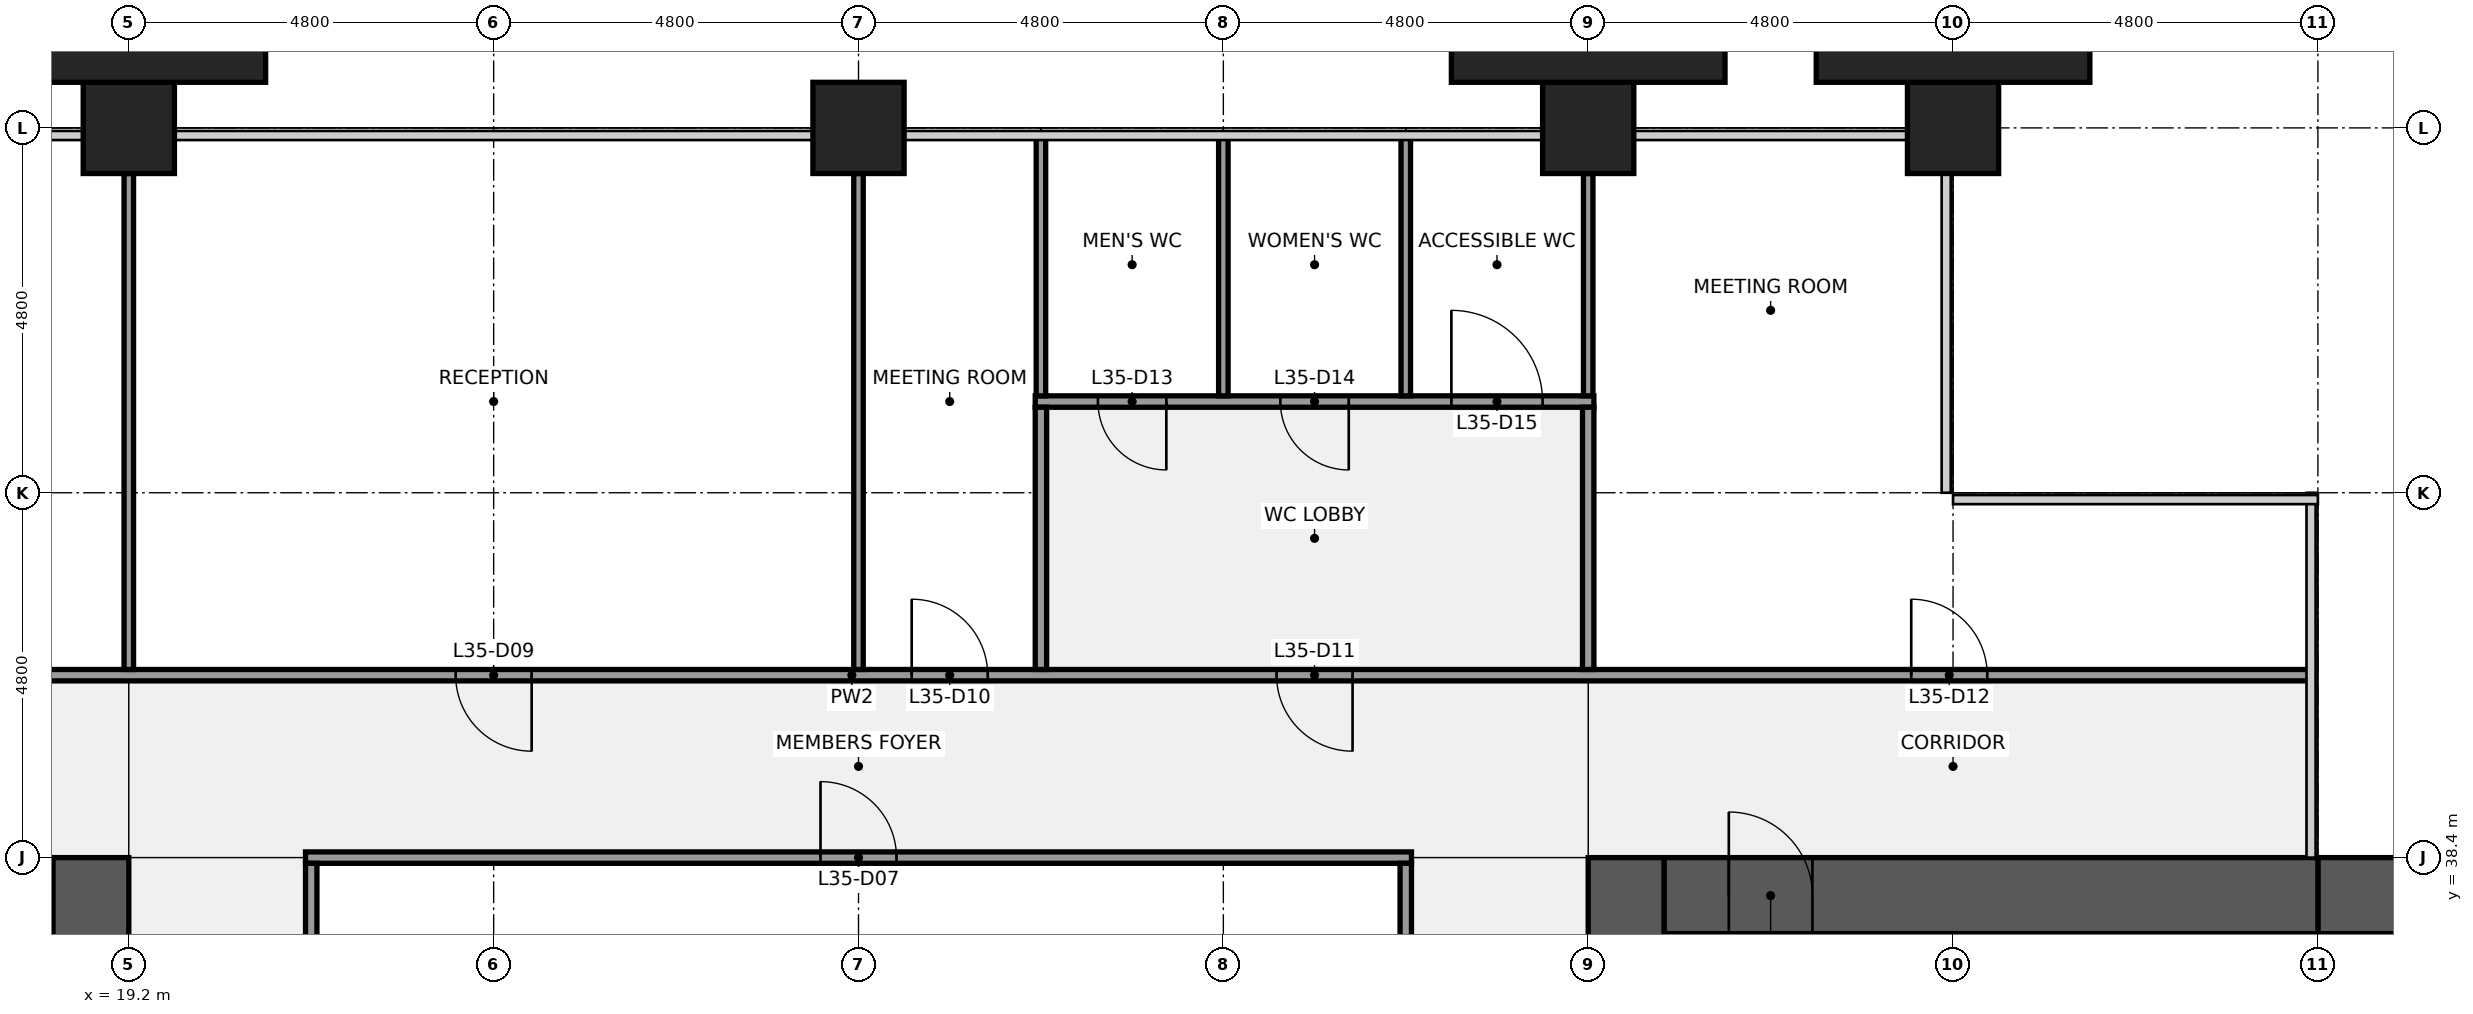
"""IFC4 building model, lengths in metres.
Left out: names, types, materials, properties, quantities, classifications, styles, units other than length and angle.
Written with IfcOpenShell. Run it as: python <this file> out.ifc"""

import sys

from ifc_helpers import new_model, si_unit, direction, frame, frame_2d, origin, origin_2d, place, context, subcontext, project, spatial, rectangle, extrude, element, fill, save


model = new_model("IFC4")
c1 = context("Model", 3, precision=1e-05, world=origin(), true_north=direction((0.0, 1.0)))
c2 = subcontext(c1, "Body", "Model", "MODEL_VIEW")
j1 = project(units=[si_unit("LENGTHUNIT", "METRE"), si_unit("PLANEANGLEUNIT", "RADIAN")], contexts=[c1])
p1 = place(None, origin())
s1 = spatial("IfcSite", under=j1, at=p1, CompositionType="ELEMENT")
p2 = place(p1, origin())
s2 = spatial("IfcBuilding", under=s1, at=p2, CompositionType="ELEMENT")
p3 = place(p2, frame((0.0, 0.0, 160.1)))
s3 = spatial("IfcBuildingStorey", under=s2, at=p3, CompositionType="ELEMENT", Elevation=160.1)
for number, where, z_axis, x_axis in (
    (1, (19.2, 48.0, 0.0), (0.0, 0.0, 1.0), (1.0, 0.0, 0.0)),
    (2, (28.8, 48.0, 0.0), (0.0, 0.0, 1.0), (1.0, 0.0, 0.0)),
    (3, (38.4, 48.0, 0.0), (0.0, 0.0, 1.0), (1.0, 0.0, 0.0)),
    (4, (43.2, 48.0, 0.0), (0.0, 0.0, 1.0), (1.0, 0.0, 0.0)),
):
    element("IfcColumn", number, at=place(p3, frame(where, z_axis=z_axis, x_axis=x_axis)), inside=s3, PredefinedType="COLUMN", context=c2, shape_type="SweptSolid", body=[
        extrude(rectangle(XDim=1.2, YDim=1.2, at=origin_2d()), origin(), (0.0, 0.0, 1.0), 4.0),
    ])
p4 = place(p3, frame((18.7, 38.4, 0.0), z_axis=(0.0, 0.0, 1.0), x_axis=(0.0, -1.0, 0.0)))
e5 = element("IfcWall", 5, at=p4, inside=s3, PredefinedType="SHEAR", context=c2, shape_type="SweptSolid", body=[
    extrude(rectangle(XDim=28.8, YDim=1.0, at=frame_2d((14.4, 0.0))), origin(), (0.0, 0.0, 1.0), 3.84),
])
p5 = place(p4, frame((18.3, 0.0, 0.0)))
e6 = element("IfcOpeningElement", 6, at=p5, cuts=e5, PredefinedType="OPENING", context=c2, shape_type="SweptSolid", body=[
    extrude(rectangle(XDim=1.8, YDim=2.1, at=frame_2d((0.9, 1.05))), frame((0.0, 0.51, 0.0), z_axis=(0.0, -1.0, 0.0), x_axis=(1.0, 0.0, 0.0)), (0.0, 0.0, 1.0), 1.02),
])
p6 = place(p4, frame((8.7, 0.0, 0.0)))
e7 = element("IfcOpeningElement", 7, at=p6, cuts=e5, PredefinedType="OPENING", context=c2, shape_type="SweptSolid", body=[
    extrude(rectangle(XDim=1.8, YDim=2.1, at=frame_2d((0.9, 1.05))), frame((0.0, 0.51, 0.0), z_axis=(0.0, -1.0, 0.0), x_axis=(1.0, 0.0, 0.0)), (0.0, 0.0, 1.0), 1.02),
])
p7 = place(p3, frame((38.9, 9.6, 0.0), z_axis=(0.0, 0.0, 1.0), x_axis=(0.0, 1.0, 0.0)))
e8 = element("IfcWall", 8, at=p7, inside=s3, PredefinedType="SHEAR", context=c2, shape_type="SweptSolid", body=[
    extrude(rectangle(XDim=28.8, YDim=1.0, at=frame_2d((14.4, 0.0))), origin(), (0.0, 0.0, 1.0), 3.84),
])
p8 = place(p7, frame((8.7, 0.0, 0.0)))
e9 = element("IfcOpeningElement", 9, at=p8, cuts=e8, PredefinedType="OPENING", context=c2, shape_type="SweptSolid", body=[
    extrude(rectangle(XDim=1.8, YDim=2.1, at=frame_2d((0.9, 1.05))), frame((0.0, 0.51, 0.0), z_axis=(0.0, -1.0, 0.0), x_axis=(1.0, 0.0, 0.0)), (0.0, 0.0, 1.0), 1.02),
])
p9 = place(p7, frame((18.3, 0.0, 0.0)))
e10 = element("IfcOpeningElement", 10, at=p9, cuts=e8, PredefinedType="OPENING", context=c2, shape_type="SweptSolid", body=[
    extrude(rectangle(XDim=1.8, YDim=2.1, at=frame_2d((0.9, 1.05))), frame((0.0, 0.51, 0.0), z_axis=(0.0, -1.0, 0.0), x_axis=(1.0, 0.0, 0.0)), (0.0, 0.0, 1.0), 1.02),
])
p10 = place(p3, frame((48.0, 37.3, 0.0), z_axis=(0.0, 0.0, 1.0), x_axis=(1.0, 0.0, 0.0)))
e11 = element("IfcWall", 11, at=p10, inside=s3, PredefinedType="SHEAR", context=c2, shape_type="SweptSolid", body=[
    extrude(rectangle(XDim=3.35, YDim=0.2, at=frame_2d((1.675, 0.0))), origin(), (0.0, 0.0, 1.0), 3.84),
])
p11 = place(p3, frame((43.85, 37.3, 0.0), z_axis=(0.0, 0.0, 1.0), x_axis=(1.0, 0.0, 0.0)))
e12 = element("IfcWall", 12, at=p11, inside=s3, PredefinedType="SHEAR", context=c2, shape_type="SweptSolid", body=[
    extrude(rectangle(XDim=4.15, YDim=0.2, at=frame_2d((2.075, 0.0))), origin(), (0.0, 0.0, 1.0), 3.84),
])
p12 = place(p3, frame((48.0, 37.9, 0.0), z_axis=(0.0, 0.0, 1.0), x_axis=(1.0, 0.0, 0.0)))
e13 = element("IfcWall", 13, at=p12, inside=s3, PredefinedType="SHEAR", context=c2, shape_type="SweptSolid", body=[
    extrude(rectangle(XDim=8.6, YDim=1.0, at=frame_2d((4.3, 0.0))), origin(), (0.0, 0.0, 1.0), 3.84),
])
p13 = place(p12, frame((1.5, 0.0, 0.9)))
e14 = element("IfcOpeningElement", 14, at=p13, cuts=e13, PredefinedType="OPENING", context=c2, shape_type="SweptSolid", body=[
    extrude(rectangle(XDim=1.8, YDim=1.5, at=frame_2d((0.9, 0.75))), frame((0.0, 0.51, 0.0), z_axis=(0.0, -1.0, 0.0), x_axis=(1.0, 0.0, 0.0)), (0.0, 0.0, 1.0), 1.02),
])
p14 = place(p3, frame((39.4, 37.9, 0.0), z_axis=(0.0, 0.0, 1.0), x_axis=(1.0, 0.0, 0.0)))
e15 = element("IfcWall", 15, at=p14, inside=s3, PredefinedType="SHEAR", context=c2, shape_type="SweptSolid", body=[
    extrude(rectangle(XDim=8.6, YDim=1.0, at=frame_2d((4.3, 0.0))), origin(), (0.0, 0.0, 1.0), 3.84),
])
p15 = place(p14, frame((0.85, 0.0, 0.0)))
e16 = element("IfcOpeningElement", 16, at=p15, cuts=e15, PredefinedType="OPENING", context=c2, shape_type="SweptSolid", body=[
    extrude(rectangle(XDim=1.1, YDim=2.1, at=frame_2d((0.55, 1.05))), frame((0.0, 0.51, 0.0), z_axis=(0.0, -1.0, 0.0), x_axis=(1.0, 0.0, 0.0)), (0.0, 0.0, 1.0), 1.02),
])
p16 = place(p3, frame((21.525, 38.4, 0.0), z_axis=(0.0, 0.0, 1.0), x_axis=(1.0, 0.0, 0.0)))
e17 = element("IfcWall", 17, at=p16, inside=s3, PredefinedType="PARTITIONING", context=c2, shape_type="SweptSolid", body=[
    extrude(rectangle(XDim=14.55, YDim=0.15, at=frame_2d((7.275, 0.0))), origin(), (0.0, 0.0, 1.0), 2.849),
])
p17 = place(p16, frame((6.775, 0.0, 0.0)))
e18 = element("IfcOpeningElement", 18, at=p17, cuts=e17, PredefinedType="OPENING", context=c2, shape_type="SweptSolid", body=[
    extrude(rectangle(XDim=1.0, YDim=2.1, at=frame_2d((0.5, 1.05))), frame((0.0, 0.085, 0.0), z_axis=(0.0, -1.0, 0.0), x_axis=(1.0, 0.0, 0.0)), (0.0, 0.0, 1.0), 0.17),
])
p18 = place(p3, frame((9.525, 40.8, 0.0), z_axis=(0.0, 0.0, 1.0), x_axis=(1.0, 0.0, 0.0)))
e19 = element("IfcWall", 19, at=p18, inside=s3, PredefinedType="PARTITIONING", context=c2, shape_type="SweptSolid", body=[
    extrude(rectangle(XDim=38.375, YDim=0.15, at=frame_2d((19.188, 0.0))), origin(), (0.0, 0.0, 1.0), 2.849),
])
p19 = place(p18, frame((4.375, 0.0, 0.0)))
e20 = element("IfcOpeningElement", 20, at=p19, cuts=e19, PredefinedType="OPENING", context=c2, shape_type="SweptSolid", body=[
    extrude(rectangle(XDim=1.0, YDim=2.1, at=frame_2d((0.5, 1.05))), frame((0.0, 0.085, 0.0), z_axis=(0.0, -1.0, 0.0), x_axis=(1.0, 0.0, 0.0)), (0.0, 0.0, 1.0), 0.17),
])
p20 = place(p18, frame((13.975, 0.0, 0.0)))
e21 = element("IfcOpeningElement", 21, at=p20, cuts=e19, PredefinedType="OPENING", context=c2, shape_type="SweptSolid", body=[
    extrude(rectangle(XDim=1.0, YDim=2.1, at=frame_2d((0.5, 1.05))), frame((0.0, 0.085, 0.0), z_axis=(0.0, -1.0, 0.0), x_axis=(1.0, 0.0, 0.0)), (0.0, 0.0, 1.0), 0.17),
])
p21 = place(p18, frame((19.975, 0.0, 0.0)))
e22 = element("IfcOpeningElement", 22, at=p21, cuts=e19, PredefinedType="OPENING", context=c2, shape_type="SweptSolid", body=[
    extrude(rectangle(XDim=1.0, YDim=2.1, at=frame_2d((0.5, 1.05))), frame((0.0, 0.085, 0.0), z_axis=(0.0, -1.0, 0.0), x_axis=(1.0, 0.0, 0.0)), (0.0, 0.0, 1.0), 0.17),
])
p22 = place(p18, frame((24.775, 0.0, 0.0)))
e23 = element("IfcOpeningElement", 23, at=p22, cuts=e19, PredefinedType="OPENING", context=c2, shape_type="SweptSolid", body=[
    extrude(rectangle(XDim=1.0, YDim=2.1, at=frame_2d((0.5, 1.05))), frame((0.0, 0.085, 0.0), z_axis=(0.0, -1.0, 0.0), x_axis=(1.0, 0.0, 0.0)), (0.0, 0.0, 1.0), 0.17),
])
p23 = place(p18, frame((33.125, 0.0, 0.0)))
e24 = element("IfcOpeningElement", 24, at=p23, cuts=e19, PredefinedType="OPENING", context=c2, shape_type="SweptSolid", body=[
    extrude(rectangle(XDim=1.0, YDim=2.1, at=frame_2d((0.5, 1.05))), frame((0.0, 0.085, 0.0), z_axis=(0.0, -1.0, 0.0), x_axis=(1.0, 0.0, 0.0)), (0.0, 0.0, 1.0), 0.17),
])
p24 = place(p3, frame((31.125, 44.4, 0.0), z_axis=(0.0, 0.0, 1.0), x_axis=(1.0, 0.0, 0.0)))
e25 = element("IfcWall", 25, at=p24, inside=s3, PredefinedType="PARTITIONING", context=c2, shape_type="SweptSolid", body=[
    extrude(rectangle(XDim=7.35, YDim=0.15, at=frame_2d((3.675, 0.0))), origin(), (0.0, 0.0, 1.0), 2.849),
])
p25 = place(p24, frame((0.825, 0.0, 0.0)))
e26 = element("IfcOpeningElement", 26, at=p25, cuts=e25, PredefinedType="OPENING", context=c2, shape_type="SweptSolid", body=[
    extrude(rectangle(XDim=0.9, YDim=2.1, at=frame_2d((0.45, 1.05))), frame((0.0, 0.085, 0.0), z_axis=(0.0, -1.0, 0.0), x_axis=(1.0, 0.0, 0.0)), (0.0, 0.0, 1.0), 0.17),
])
p26 = place(p24, frame((3.225, 0.0, 0.0)))
e27 = element("IfcOpeningElement", 27, at=p26, cuts=e25, PredefinedType="OPENING", context=c2, shape_type="SweptSolid", body=[
    extrude(rectangle(XDim=0.9, YDim=2.1, at=frame_2d((0.45, 1.05))), frame((0.0, 0.085, 0.0), z_axis=(0.0, -1.0, 0.0), x_axis=(1.0, 0.0, 0.0)), (0.0, 0.0, 1.0), 0.17),
])
p27 = place(p24, frame((5.475, 0.0, 0.0)))
e28 = element("IfcOpeningElement", 28, at=p27, cuts=e25, PredefinedType="OPENING", context=c2, shape_type="SweptSolid", body=[
    extrude(rectangle(XDim=1.2, YDim=2.1, at=frame_2d((0.6, 1.05))), frame((0.0, 0.085, 0.0), z_axis=(0.0, -1.0, 0.0), x_axis=(1.0, 0.0, 0.0)), (0.0, 0.0, 1.0), 0.17),
])
p28 = place(p3, frame((19.2, 40.875, 0.0), z_axis=(0.0, 0.0, 1.0), x_axis=(0.0, 1.0, 0.0)))
e29 = element("IfcWall", 29, at=p28, inside=s3, PredefinedType="PARTITIONING", context=c2, shape_type="SweptSolid", body=[
    extrude(rectangle(XDim=6.525, YDim=0.125, at=frame_2d((3.262, 0.0))), origin(), (0.0, 0.0, 1.0), 2.849),
])
p29 = place(p3, frame((21.6, 33.675, 0.0), z_axis=(0.0, 0.0, 1.0), x_axis=(0.0, 1.0, 0.0)))
e30 = element("IfcWall", 30, at=p29, inside=s3, PredefinedType="PARTITIONING", context=c2, shape_type="SweptSolid", body=[
    extrude(rectangle(XDim=4.65, YDim=0.15, at=frame_2d((2.325, 0.0))), origin(), (0.0, 0.0, 1.0), 2.849),
])
p30 = place(p3, frame((28.8, 40.875, 0.0), z_axis=(0.0, 0.0, 1.0), x_axis=(0.0, 1.0, 0.0)))
e31 = element("IfcWall", 31, at=p30, inside=s3, PredefinedType="PARTITIONING", context=c2, shape_type="SweptSolid", body=[
    extrude(rectangle(XDim=6.525, YDim=0.125, at=frame_2d((3.262, 0.0))), origin(), (0.0, 0.0, 1.0), 2.849),
])
p31 = place(p3, frame((31.2, 44.475, 0.0), z_axis=(0.0, 0.0, 1.0), x_axis=(0.0, 1.0, 0.0)))
e32 = element("IfcWall", 32, at=p31, inside=s3, PredefinedType="PARTITIONING", context=c2, shape_type="SweptSolid", body=[
    extrude(rectangle(XDim=3.425, YDim=0.125, at=frame_2d((1.712, 0.0))), origin(), (0.0, 0.0, 1.0), 2.849),
])
p32 = place(p3, frame((31.2, 40.875, 0.0), z_axis=(0.0, 0.0, 1.0), x_axis=(0.0, 1.0, 0.0)))
e33 = element("IfcWall", 33, at=p32, inside=s3, PredefinedType="PARTITIONING", context=c2, shape_type="SweptSolid", body=[
    extrude(rectangle(XDim=3.45, YDim=0.15, at=frame_2d((1.725, 0.0))), origin(), (0.0, 0.0, 1.0), 2.849),
])
for number, where, z_axis, x_axis in (
    (34, (33.6, 44.475, 0.0), (0.0, 0.0, 1.0), (0.0, 1.0, 0.0)),
    (35, (36.0, 44.475, 0.0), (0.0, 0.0, 1.0), (0.0, 1.0, 0.0)),
):
    element("IfcWall", number, at=place(p3, frame(where, z_axis=z_axis, x_axis=x_axis)), inside=s3, PredefinedType="PARTITIONING", context=c2, shape_type="SweptSolid", body=[
        extrude(rectangle(XDim=3.425, YDim=0.125, at=frame_2d((1.712, 0.0))), origin(), (0.0, 0.0, 1.0), 2.849),
    ])
p33 = place(p3, frame((36.0, 33.675, 0.0), z_axis=(0.0, 0.0, 1.0), x_axis=(0.0, 1.0, 0.0)))
e36 = element("IfcWall", 36, at=p33, inside=s3, PredefinedType="PARTITIONING", context=c2, shape_type="SweptSolid", body=[
    extrude(rectangle(XDim=4.65, YDim=0.15, at=frame_2d((2.325, 0.0))), origin(), (0.0, 0.0, 1.0), 2.849),
])
p34 = place(p3, frame((38.4, 44.475, 0.0), z_axis=(0.0, 0.0, 1.0), x_axis=(0.0, 1.0, 0.0)))
e37 = element("IfcWall", 37, at=p34, inside=s3, PredefinedType="PARTITIONING", context=c2, shape_type="SweptSolid", body=[
    extrude(rectangle(XDim=2.925, YDim=0.125, at=frame_2d((1.462, 0.0))), origin(), (0.0, 0.0, 1.0), 2.849),
])
p35 = place(p3, frame((38.4, 40.875, 0.0), z_axis=(0.0, 0.0, 1.0), x_axis=(0.0, 1.0, 0.0)))
e38 = element("IfcWall", 38, at=p35, inside=s3, PredefinedType="PARTITIONING", context=c2, shape_type="SweptSolid", body=[
    extrude(rectangle(XDim=3.45, YDim=0.15, at=frame_2d((1.725, 0.0))), origin(), (0.0, 0.0, 1.0), 2.849),
])
for number, where, z_axis, x_axis in (
    (39, (19.2, 49.05, 0.0), (0.0, 0.0, 1.0), (1.0, 0.0, 0.0)),
    (40, (38.4, 49.05, 0.0), (0.0, 0.0, 1.0), (1.0, 0.0, 0.0)),
    (41, (43.2, 49.05, 0.0), (0.0, 0.0, 1.0), (1.0, 0.0, 0.0)),
):
    element("IfcColumn", number, at=place(p3, frame(where, z_axis=z_axis, x_axis=x_axis)), inside=s3, PredefinedType="PILASTER", context=c2, shape_type="SweptSolid", body=[
        extrude(rectangle(XDim=3.6, YDim=0.9, at=origin_2d()), origin(), (0.0, 0.0, 1.0), 4.0),
    ])
p36 = place(p15, origin())
e42 = element("IfcDoor", 42, at=p36, inside=s3, OperationType="SINGLE_SWING_LEFT", PredefinedType="DOOR", context=c2, shape_type="SweptSolid", body=[
    extrude(rectangle(XDim=1.1, YDim=2.1, at=frame_2d((0.55, 1.05))), frame((0.0, 0.025, 0.0), z_axis=(0.0, -1.0, 0.0), x_axis=(1.0, 0.0, 0.0)), (0.0, 0.0, 1.0), 0.05),
])
fill(e16, e42)
p37 = place(p17, origin())
e43 = element("IfcDoor", 43, at=p37, inside=s3, OperationType="SINGLE_SWING_LEFT", PredefinedType="DOOR", context=c2, shape_type="SweptSolid", body=[
    extrude(rectangle(XDim=1.0, YDim=2.1, at=frame_2d((0.5, 1.05))), frame((0.0, 0.025, 0.0), z_axis=(0.0, -1.0, 0.0), x_axis=(1.0, 0.0, 0.0)), (0.0, 0.0, 1.0), 0.05),
])
fill(e18, e43)
p38 = place(p20, origin())
e44 = element("IfcDoor", 44, at=p38, inside=s3, OperationType="SINGLE_SWING_RIGHT", PredefinedType="DOOR", context=c2, shape_type="SweptSolid", body=[
    extrude(rectangle(XDim=1.0, YDim=2.1, at=frame_2d((0.5, 1.05))), frame((0.0, 0.025, 0.0), z_axis=(0.0, -1.0, 0.0), x_axis=(1.0, 0.0, 0.0)), (0.0, 0.0, 1.0), 0.05),
])
fill(e21, e44)
p39 = place(p21, origin())
e45 = element("IfcDoor", 45, at=p39, inside=s3, OperationType="SINGLE_SWING_LEFT", PredefinedType="DOOR", context=c2, shape_type="SweptSolid", body=[
    extrude(rectangle(XDim=1.0, YDim=2.1, at=frame_2d((0.5, 1.05))), frame((0.0, 0.025, 0.0), z_axis=(0.0, -1.0, 0.0), x_axis=(1.0, 0.0, 0.0)), (0.0, 0.0, 1.0), 0.05),
])
fill(e22, e45)
p40 = place(p22, origin())
e46 = element("IfcDoor", 46, at=p40, inside=s3, OperationType="SINGLE_SWING_RIGHT", PredefinedType="DOOR", context=c2, shape_type="SweptSolid", body=[
    extrude(rectangle(XDim=1.0, YDim=2.1, at=frame_2d((0.5, 1.05))), frame((0.0, 0.025, 0.0), z_axis=(0.0, -1.0, 0.0), x_axis=(1.0, 0.0, 0.0)), (0.0, 0.0, 1.0), 0.05),
])
fill(e23, e46)
p41 = place(p23, origin())
e47 = element("IfcDoor", 47, at=p41, inside=s3, OperationType="SINGLE_SWING_LEFT", PredefinedType="DOOR", context=c2, shape_type="SweptSolid", body=[
    extrude(rectangle(XDim=1.0, YDim=2.1, at=frame_2d((0.5, 1.05))), frame((0.0, 0.025, 0.0), z_axis=(0.0, -1.0, 0.0), x_axis=(1.0, 0.0, 0.0)), (0.0, 0.0, 1.0), 0.05),
])
fill(e24, e47)
p42 = place(p25, origin())
e48 = element("IfcDoor", 48, at=p42, inside=s3, OperationType="SINGLE_SWING_RIGHT", PredefinedType="DOOR", context=c2, shape_type="SweptSolid", body=[
    extrude(rectangle(XDim=0.9, YDim=2.1, at=frame_2d((0.45, 1.05))), frame((0.0, 0.025, 0.0), z_axis=(0.0, -1.0, 0.0), x_axis=(1.0, 0.0, 0.0)), (0.0, 0.0, 1.0), 0.05),
])
fill(e26, e48)
p43 = place(p26, origin())
e49 = element("IfcDoor", 49, at=p43, inside=s3, OperationType="SINGLE_SWING_RIGHT", PredefinedType="DOOR", context=c2, shape_type="SweptSolid", body=[
    extrude(rectangle(XDim=0.9, YDim=2.1, at=frame_2d((0.45, 1.05))), frame((0.0, 0.025, 0.0), z_axis=(0.0, -1.0, 0.0), x_axis=(1.0, 0.0, 0.0)), (0.0, 0.0, 1.0), 0.05),
])
fill(e27, e49)
p44 = place(p27, origin())
e50 = element("IfcDoor", 50, at=p44, inside=s3, OperationType="SINGLE_SWING_LEFT", PredefinedType="DOOR", context=c2, shape_type="SweptSolid", body=[
    extrude(rectangle(XDim=1.2, YDim=2.1, at=frame_2d((0.6, 1.05))), frame((0.0, 0.025, 0.0), z_axis=(0.0, -1.0, 0.0), x_axis=(1.0, 0.0, 0.0)), (0.0, 0.0, 1.0), 0.05),
])
fill(e28, e50)
save(model, sys.argv[1])
